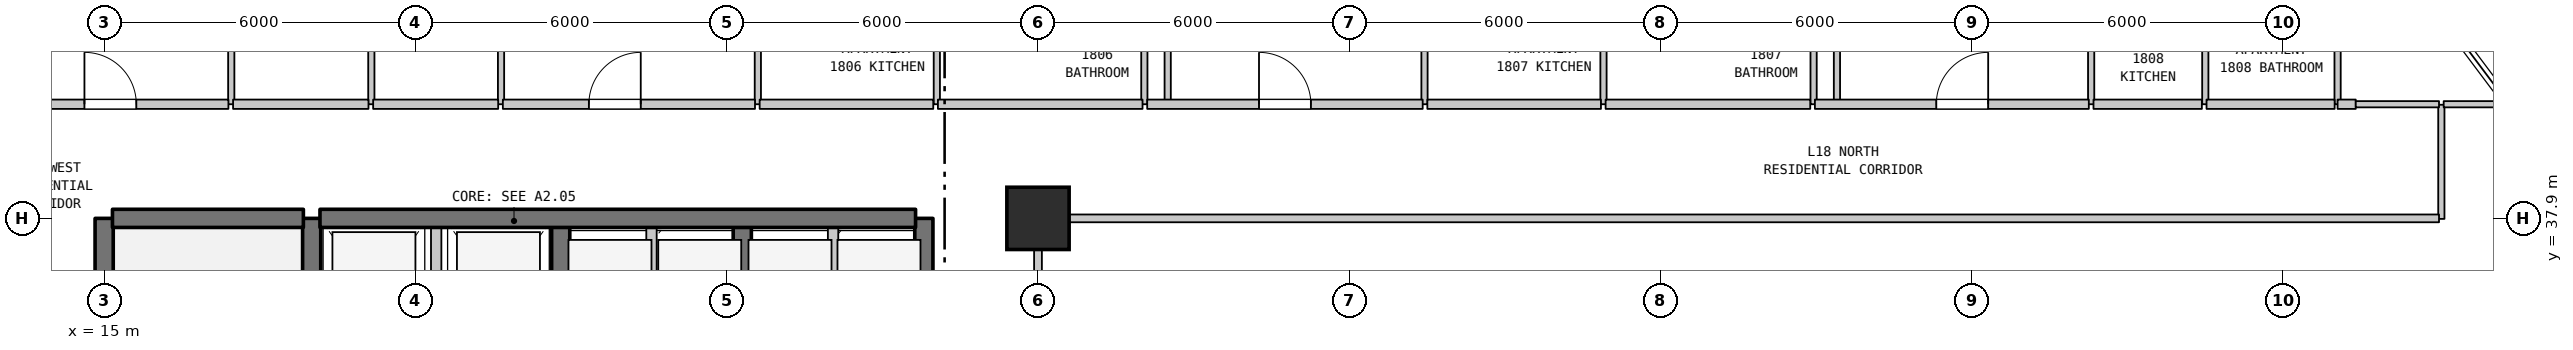
"""IFC4 building model, lengths in metres.
Left out: names, types, materials, properties, quantities, classifications, styles, units other than length and angle.
Written with IfcOpenShell. Run it as: python <this file> out.ifc"""

import sys

from ifc_helpers import new_model, si_unit, direction, frame, frame_2d, origin, origin_2d, place, context, subcontext, project, spatial, rectangle, extrude, element, fill, save


model = new_model("IFC4")
c1 = context("Model", 3, precision=1e-05, world=origin(), true_north=direction((0.0, 1.0)))
c2 = subcontext(c1, "Body", "Model", "MODEL_VIEW")
j1 = project(units=[si_unit("LENGTHUNIT", "METRE"), si_unit("PLANEANGLEUNIT", "RADIAN")], contexts=[c1])
p1 = place(None, origin())
s1 = spatial("IfcSite", under=j1, at=p1, CompositionType="ELEMENT")
p2 = place(p1, origin())
s2 = spatial("IfcBuilding", under=s1, at=p2, CompositionType="ELEMENT")
p3 = place(p2, frame((0.0, 0.0, 77.5)))
s3 = spatial("IfcBuildingStorey", under=s2, at=p3, CompositionType="ELEMENT", Elevation=77.5)
p4 = place(p3, frame((33.0, 37.9, 0.0), z_axis=(0.0, 0.0, 1.0), x_axis=(1.0, 0.0, 0.0)))
e1 = element("IfcColumn", 1, at=p4, inside=s3, PredefinedType="COLUMN", context=c2, shape_type="SweptSolid", body=[
    extrude(rectangle(XDim=1.2, YDim=1.2, at=origin_2d()), origin(), (0.0, 0.0, 1.0), 3.7),
])
p5 = place(p3, frame((15.0, 31.1, 0.0), z_axis=(0.0, 0.0, 1.0), x_axis=(0.0, 1.0, 0.0)))
e2 = element("IfcWall", 2, at=p5, inside=s3, PredefinedType="SHEAR", context=c2, shape_type="SweptSolid", body=[
    extrude(rectangle(XDim=6.8, YDim=0.35, at=frame_2d((3.4, 0.0))), origin(), (0.0, 0.0, 1.0), 3.28),
])
p6 = place(p3, frame((17.45, 40.1, 0.0), z_axis=(0.0, 0.0, 1.0), x_axis=(0.0, 1.0, 0.0)))
e3 = element("IfcWall", 3, at=p6, inside=s3, PredefinedType="PARTITIONING", context=c2, shape_type="SweptSolid", body=[
    extrude(rectangle(XDim=3.2, YDim=0.12, at=frame_2d((1.6, 0.0))), origin(), (0.0, 0.0, 1.0), 3.28),
])
p7 = place(p3, frame((19.0, 35.0, 0.0), z_axis=(0.0, 0.0, 1.0), x_axis=(0.0, 1.0, 0.0)))
e4 = element("IfcWall", 4, at=p7, inside=s3, PredefinedType="SHEAR", context=c2, shape_type="SweptSolid", body=[
    extrude(rectangle(XDim=2.9, YDim=0.35, at=frame_2d((1.45, 0.0))), origin(), (0.0, 0.0, 1.0), 3.28),
])
p8 = place(p3, frame((20.15, 40.1, 0.0), z_axis=(0.0, 0.0, 1.0), x_axis=(0.0, 1.0, 0.0)))
e5 = element("IfcWall", 5, at=p8, inside=s3, PredefinedType="PARTITIONING", context=c2, shape_type="SweptSolid", body=[
    extrude(rectangle(XDim=3.2, YDim=0.12, at=frame_2d((1.6, 0.0))), origin(), (0.0, 0.0, 1.0), 3.28),
])
p9 = place(p8, frame((1.15, 0.0, 0.0)))
e6 = element("IfcOpeningElement", 6, at=p9, cuts=e5, PredefinedType="OPENING", context=c2, shape_type="SweptSolid", body=[
    extrude(rectangle(XDim=0.9, YDim=2.15, at=frame_2d((0.45, 1.075))), frame((0.0, 0.07, 0.0), z_axis=(0.0, -1.0, 0.0), x_axis=(1.0, 0.0, 0.0)), (0.0, 0.0, 1.0), 0.14),
])
p10 = place(p3, frame((21.4, 35.0, 0.0), z_axis=(0.0, 0.0, 1.0), x_axis=(0.0, 1.0, 0.0)))
e7 = element("IfcWall", 7, at=p10, inside=s3, PredefinedType="STANDARD", context=c2, shape_type="SweptSolid", body=[
    extrude(rectangle(XDim=2.9, YDim=0.2, at=frame_2d((1.45, 0.0))), origin(), (0.0, 0.0, 1.0), 3.28),
])
p11 = place(p3, frame((22.65, 40.1, 0.0), z_axis=(0.0, 0.0, 1.0), x_axis=(0.0, 1.0, 0.0)))
e8 = element("IfcWall", 8, at=p11, inside=s3, PredefinedType="PARTITIONING", context=c2, shape_type="SweptSolid", body=[
    extrude(rectangle(XDim=2.05, YDim=0.12, at=frame_2d((1.025, 0.0))), origin(), (0.0, 0.0, 1.0), 3.28),
])
p12 = place(p3, frame((23.8, 35.0, 0.0), z_axis=(0.0, 0.0, 1.0), x_axis=(0.0, 1.0, 0.0)))
e9 = element("IfcWall", 9, at=p12, inside=s3, PredefinedType="SHEAR", context=c2, shape_type="SweptSolid", body=[
    extrude(rectangle(XDim=2.9, YDim=0.35, at=frame_2d((1.45, 0.0))), origin(), (0.0, 0.0, 1.0), 3.28),
])
p13 = place(p3, frame((25.55, 35.0, 0.0), z_axis=(0.0, 0.0, 1.0), x_axis=(0.0, 1.0, 0.0)))
e10 = element("IfcWall", 10, at=p13, inside=s3, PredefinedType="STANDARD", context=c2, shape_type="SweptSolid", body=[
    extrude(rectangle(XDim=2.9, YDim=0.2, at=frame_2d((1.45, 0.0))), origin(), (0.0, 0.0, 1.0), 3.28),
])
p14 = place(p3, frame((27.3, 35.0, 0.0), z_axis=(0.0, 0.0, 1.0), x_axis=(0.0, 1.0, 0.0)))
e11 = element("IfcWall", 11, at=p14, inside=s3, PredefinedType="SHEAR", context=c2, shape_type="SweptSolid", body=[
    extrude(rectangle(XDim=2.9, YDim=0.35, at=frame_2d((1.45, 0.0))), origin(), (0.0, 0.0, 1.0), 3.28),
])
p15 = place(p3, frame((27.6, 40.1, 0.0), z_axis=(0.0, 0.0, 1.0), x_axis=(0.0, 1.0, 0.0)))
e12 = element("IfcWall", 12, at=p15, inside=s3, PredefinedType="PARTITIONING", context=c2, shape_type="SweptSolid", body=[
    extrude(rectangle(XDim=2.3, YDim=0.12, at=frame_2d((1.15, 0.0))), origin(), (0.0, 0.0, 1.0), 3.28),
])
p16 = place(p3, frame((29.05, 35.0, 0.0), z_axis=(0.0, 0.0, 1.0), x_axis=(0.0, 1.0, 0.0)))
e13 = element("IfcWall", 13, at=p16, inside=s3, PredefinedType="STANDARD", context=c2, shape_type="SweptSolid", body=[
    extrude(rectangle(XDim=2.9, YDim=0.2, at=frame_2d((1.45, 0.0))), origin(), (0.0, 0.0, 1.0), 3.28),
])
p17 = place(p3, frame((30.8, 35.0, 0.0), z_axis=(0.0, 0.0, 1.0), x_axis=(0.0, 1.0, 0.0)))
e14 = element("IfcWall", 14, at=p17, inside=s3, PredefinedType="SHEAR", context=c2, shape_type="SweptSolid", body=[
    extrude(rectangle(XDim=2.9, YDim=0.35, at=frame_2d((1.45, 0.0))), origin(), (0.0, 0.0, 1.0), 3.28),
])
p18 = place(p3, frame((31.05, 40.1, 0.0), z_axis=(0.0, 0.0, 1.0), x_axis=(0.0, 1.0, 0.0)))
e15 = element("IfcWall", 15, at=p18, inside=s3, PredefinedType="PARTITIONING", context=c2, shape_type="SweptSolid", body=[
    extrude(rectangle(XDim=2.3, YDim=0.12, at=frame_2d((1.15, 0.0))), origin(), (0.0, 0.0, 1.0), 3.28),
])
p19 = place(p3, frame((33.0, 27.91, 0.0), z_axis=(0.0, 0.0, 1.0), x_axis=(0.0, 1.0, 0.0)))
e16 = element("IfcWall", 16, at=p19, inside=s3, PredefinedType="STANDARD", context=c2, shape_type="SweptSolid", body=[
    extrude(rectangle(XDim=9.98, YDim=0.15, at=frame_2d((4.99, 0.0))), origin(), (0.0, 0.0, 1.0), 2.78),
])
p20 = place(p3, frame((35.05, 40.1, 0.0), z_axis=(0.0, 0.0, 1.0), x_axis=(0.0, 1.0, 0.0)))
e17 = element("IfcWall", 17, at=p20, inside=s3, PredefinedType="PARTITIONING", context=c2, shape_type="SweptSolid", body=[
    extrude(rectangle(XDim=2.3, YDim=0.12, at=frame_2d((1.15, 0.0))), origin(), (0.0, 0.0, 1.0), 3.28),
])
p21 = place(p3, frame((35.5, 40.1, 0.0), z_axis=(0.0, 0.0, 1.0), x_axis=(0.0, 1.0, 0.0)))
e18 = element("IfcWall", 18, at=p21, inside=s3, PredefinedType="PARTITIONING", context=c2, shape_type="SweptSolid", body=[
    extrude(rectangle(XDim=2.05, YDim=0.12, at=frame_2d((1.025, 0.0))), origin(), (0.0, 0.0, 1.0), 3.28),
])
for number, where, z_axis, x_axis in (
    (19, (40.45, 40.1, 0.0), (0.0, 0.0, 1.0), (0.0, 1.0, 0.0)),
    (20, (43.9, 40.1, 0.0), (0.0, 0.0, 1.0), (0.0, 1.0, 0.0)),
    (21, (47.95, 40.1, 0.0), (0.0, 0.0, 1.0), (0.0, 1.0, 0.0)),
):
    element("IfcWall", number, at=place(p3, frame(where, z_axis=z_axis, x_axis=x_axis)), inside=s3, PredefinedType="PARTITIONING", context=c2, shape_type="SweptSolid", body=[
        extrude(rectangle(XDim=2.3, YDim=0.12, at=frame_2d((1.15, 0.0))), origin(), (0.0, 0.0, 1.0), 3.28),
    ])
p22 = place(p3, frame((48.4, 40.1, 0.0), z_axis=(0.0, 0.0, 1.0), x_axis=(0.0, 1.0, 0.0)))
e22 = element("IfcWall", 22, at=p22, inside=s3, PredefinedType="PARTITIONING", context=c2, shape_type="SweptSolid", body=[
    extrude(rectangle(XDim=13.79, YDim=0.12, at=frame_2d((6.895, 0.0))), origin(), (0.0, 0.0, 1.0), 3.28),
])
for number, where, z_axis, x_axis in (
    (23, (53.3, 40.1, 0.0), (0.0, 0.0, 1.0), (0.0, 1.0, 0.0)),
    (24, (55.5, 40.1, 0.0), (0.0, 0.0, 1.0), (0.0, 1.0, 0.0)),
    (25, (58.05, 40.1, 0.0), (0.0, 0.0, 1.0), (0.0, 1.0, 0.0)),
):
    element("IfcWall", number, at=place(p3, frame(where, z_axis=z_axis, x_axis=x_axis)), inside=s3, PredefinedType="PARTITIONING", context=c2, shape_type="SweptSolid", body=[
        extrude(rectangle(XDim=2.3, YDim=0.12, at=frame_2d((1.15, 0.0))), origin(), (0.0, 0.0, 1.0), 3.28),
    ])
p23 = place(p3, frame((60.05, 37.89, 0.0), z_axis=(0.0, 0.0, 1.0), x_axis=(0.0, 1.0, 0.0)))
e26 = element("IfcWall", 26, at=p23, inside=s3, PredefinedType="PARTITIONING", context=c2, shape_type="SweptSolid", body=[
    extrude(rectangle(XDim=2.2, YDim=0.12, at=frame_2d((1.1, 0.0))), origin(), (0.0, 0.0, 1.0), 3.28),
])
p24 = place(p3, frame((15.16, 37.9, 0.0), z_axis=(0.0, 0.0, 1.0), x_axis=(1.0, 0.0, 0.0)))
e27 = element("IfcWall", 27, at=p24, inside=s3, PredefinedType="SHEAR", context=c2, shape_type="SweptSolid", body=[
    extrude(rectangle(XDim=3.68, YDim=0.35, at=frame_2d((1.84, 0.0))), origin(), (0.0, 0.0, 1.0), 3.28),
])
p25 = place(p3, frame((19.16, 37.9, 0.0), z_axis=(0.0, 0.0, 1.0), x_axis=(1.0, 0.0, 0.0)))
e28 = element("IfcWall", 28, at=p25, inside=s3, PredefinedType="SHEAR", context=c2, shape_type="SweptSolid", body=[
    extrude(rectangle(XDim=11.48, YDim=0.35, at=frame_2d((5.74, 0.0))), origin(), (0.0, 0.0, 1.0), 3.28),
])
p26 = place(p3, frame((33.07, 37.9, 0.0), z_axis=(0.0, 0.0, 1.0), x_axis=(1.0, 0.0, 0.0)))
e29 = element("IfcWall", 29, at=p26, inside=s3, PredefinedType="STANDARD", context=c2, shape_type="SweptSolid", body=[
    extrude(rectangle(XDim=26.935, YDim=0.15, at=frame_2d((13.467, 0.0))), origin(), (0.0, 0.0, 1.0), 3.28),
])
p27 = place(p3, frame((12.875, 40.1, 0.0), z_axis=(0.0, 0.0, 1.0), x_axis=(1.0, 0.0, 0.0)))
e30 = element("IfcWall", 30, at=p27, inside=s3, PredefinedType="STANDARD", context=c2, shape_type="SweptSolid", body=[
    extrude(rectangle(XDim=4.52, YDim=0.18, at=frame_2d((2.26, 0.0))), origin(), (0.0, 0.0, 1.0), 3.28),
])
p28 = place(p27, frame((1.745, 0.0, 0.0)))
e31 = element("IfcOpeningElement", 31, at=p28, cuts=e30, PredefinedType="OPENING", context=c2, shape_type="SweptSolid", body=[
    extrude(rectangle(XDim=1.0, YDim=2.15, at=frame_2d((0.5, 1.075))), frame((0.0, 0.1, 0.0), z_axis=(0.0, -1.0, 0.0), x_axis=(1.0, 0.0, 0.0)), (0.0, 0.0, 1.0), 0.2),
])
p29 = place(p3, frame((17.485, 40.1, 0.0), z_axis=(0.0, 0.0, 1.0), x_axis=(1.0, 0.0, 0.0)))
e32 = element("IfcWall", 32, at=p29, inside=s3, PredefinedType="STANDARD", context=c2, shape_type="SweptSolid", body=[
    extrude(rectangle(XDim=2.61, YDim=0.18, at=frame_2d((1.305, 0.0))), origin(), (0.0, 0.0, 1.0), 3.28),
])
p30 = place(p3, frame((20.185, 40.1, 0.0), z_axis=(0.0, 0.0, 1.0), x_axis=(1.0, 0.0, 0.0)))
e33 = element("IfcWall", 33, at=p30, inside=s3, PredefinedType="STANDARD", context=c2, shape_type="SweptSolid", body=[
    extrude(rectangle(XDim=2.41, YDim=0.18, at=frame_2d((1.205, 0.0))), origin(), (0.0, 0.0, 1.0), 3.28),
])
p31 = place(p3, frame((22.685, 40.1, 0.0), z_axis=(0.0, 0.0, 1.0), x_axis=(1.0, 0.0, 0.0)))
e34 = element("IfcWall", 34, at=p31, inside=s3, PredefinedType="STANDARD", context=c2, shape_type="SweptSolid", body=[
    extrude(rectangle(XDim=4.86, YDim=0.18, at=frame_2d((2.43, 0.0))), origin(), (0.0, 0.0, 1.0), 3.28),
])
p32 = place(p31, frame((1.658, 0.0, 0.0)))
e35 = element("IfcOpeningElement", 35, at=p32, cuts=e34, PredefinedType="OPENING", context=c2, shape_type="SweptSolid", body=[
    extrude(rectangle(XDim=1.0, YDim=2.15, at=frame_2d((0.5, 1.075))), frame((0.0, 0.1, 0.0), z_axis=(0.0, -1.0, 0.0), x_axis=(1.0, 0.0, 0.0)), (0.0, 0.0, 1.0), 0.2),
])
p33 = place(p3, frame((27.635, 40.1, 0.0), z_axis=(0.0, 0.0, 1.0), x_axis=(1.0, 0.0, 0.0)))
e36 = element("IfcWall", 36, at=p33, inside=s3, PredefinedType="STANDARD", context=c2, shape_type="SweptSolid", body=[
    extrude(rectangle(XDim=3.346, YDim=0.18, at=frame_2d((1.673, 0.0))), origin(), (0.0, 0.0, 1.0), 3.28),
])
p34 = place(p3, frame((31.071, 40.1, 0.0), z_axis=(0.0, 0.0, 1.0), x_axis=(1.0, 0.0, 0.0)))
e37 = element("IfcWall", 37, at=p34, inside=s3, PredefinedType="STANDARD", context=c2, shape_type="SweptSolid", body=[
    extrude(rectangle(XDim=3.944, YDim=0.18, at=frame_2d((1.972, 0.0))), origin(), (0.0, 0.0, 1.0), 3.28),
])
p35 = place(p3, frame((35.105, 40.1, 0.0), z_axis=(0.0, 0.0, 1.0), x_axis=(1.0, 0.0, 0.0)))
e38 = element("IfcWall", 38, at=p35, inside=s3, PredefinedType="STANDARD", context=c2, shape_type="SweptSolid", body=[
    extrude(rectangle(XDim=5.31, YDim=0.18, at=frame_2d((2.655, 0.0))), origin(), (0.0, 0.0, 1.0), 3.28),
])
p36 = place(p35, frame((2.155, 0.0, 0.0)))
e39 = element("IfcOpeningElement", 39, at=p36, cuts=e38, PredefinedType="OPENING", context=c2, shape_type="SweptSolid", body=[
    extrude(rectangle(XDim=1.0, YDim=2.15, at=frame_2d((0.5, 1.075))), frame((0.0, 0.1, 0.0), z_axis=(0.0, -1.0, 0.0), x_axis=(1.0, 0.0, 0.0)), (0.0, 0.0, 1.0), 0.2),
])
p37 = place(p3, frame((40.505, 40.1, 0.0), z_axis=(0.0, 0.0, 1.0), x_axis=(1.0, 0.0, 0.0)))
e40 = element("IfcWall", 40, at=p37, inside=s3, PredefinedType="STANDARD", context=c2, shape_type="SweptSolid", body=[
    extrude(rectangle(XDim=3.346, YDim=0.18, at=frame_2d((1.673, 0.0))), origin(), (0.0, 0.0, 1.0), 3.28),
])
p38 = place(p3, frame((43.941, 40.1, 0.0), z_axis=(0.0, 0.0, 1.0), x_axis=(1.0, 0.0, 0.0)))
e41 = element("IfcWall", 41, at=p38, inside=s3, PredefinedType="STANDARD", context=c2, shape_type="SweptSolid", body=[
    extrude(rectangle(XDim=3.944, YDim=0.18, at=frame_2d((1.972, 0.0))), origin(), (0.0, 0.0, 1.0), 3.28),
])
p39 = place(p3, frame((47.975, 40.1, 0.0), z_axis=(0.0, 0.0, 1.0), x_axis=(1.0, 0.0, 0.0)))
e42 = element("IfcWall", 42, at=p39, inside=s3, PredefinedType="STANDARD", context=c2, shape_type="SweptSolid", body=[
    extrude(rectangle(XDim=5.28, YDim=0.18, at=frame_2d((2.64, 0.0))), origin(), (0.0, 0.0, 1.0), 3.28),
])
p40 = place(p39, frame((2.34, 0.0, 0.0)))
e43 = element("IfcOpeningElement", 43, at=p40, cuts=e42, PredefinedType="OPENING", context=c2, shape_type="SweptSolid", body=[
    extrude(rectangle(XDim=1.0, YDim=2.15, at=frame_2d((0.5, 1.075))), frame((0.0, 0.1, 0.0), z_axis=(0.0, -1.0, 0.0), x_axis=(1.0, 0.0, 0.0)), (0.0, 0.0, 1.0), 0.2),
])
p41 = place(p3, frame((53.345, 40.1, 0.0), z_axis=(0.0, 0.0, 1.0), x_axis=(1.0, 0.0, 0.0)))
e44 = element("IfcWall", 44, at=p41, inside=s3, PredefinedType="STANDARD", context=c2, shape_type="SweptSolid", body=[
    extrude(rectangle(XDim=2.089, YDim=0.18, at=frame_2d((1.044, 0.0))), origin(), (0.0, 0.0, 1.0), 3.28),
])
p42 = place(p3, frame((55.524, 40.1, 0.0), z_axis=(0.0, 0.0, 1.0), x_axis=(1.0, 0.0, 0.0)))
e45 = element("IfcWall", 45, at=p42, inside=s3, PredefinedType="STANDARD", context=c2, shape_type="SweptSolid", body=[
    extrude(rectangle(XDim=2.469, YDim=0.18, at=frame_2d((1.234, 0.0))), origin(), (0.0, 0.0, 1.0), 3.28),
])
p43 = place(p3, frame((58.05, 40.1, 0.0), z_axis=(0.0, 0.0, 1.0), x_axis=(1.0, 0.0, 0.0)))
e46 = element("IfcWall", 46, at=p43, inside=s3, PredefinedType="STANDARD", context=c2, shape_type="SweptSolid", body=[
    extrude(rectangle(XDim=0.35, YDim=0.18, at=frame_2d((0.175, 0.0))), origin(), (0.0, 0.0, 1.0), 3.28),
])
p44 = place(p3, frame((58.4, 40.1, 0.0), z_axis=(0.0, 0.0, 1.0), x_axis=(1.0, 0.0, 0.0)))
e47 = element("IfcWall", 47, at=p44, inside=s3, PredefinedType="PARTITIONING", context=c2, shape_type="SweptSolid", body=[
    extrude(rectangle(XDim=1.605, YDim=0.12, at=frame_2d((0.802, 0.0))), origin(), (0.0, 0.0, 1.0), 3.28),
])
p45 = place(p3, frame((60.095, 40.1, 0.0), z_axis=(0.0, 0.0, 1.0), x_axis=(1.0, 0.0, 0.0)))
e48 = element("IfcWall", 48, at=p45, inside=s3, PredefinedType="PARTITIONING", context=c2, shape_type="SweptSolid", body=[
    extrude(rectangle(XDim=1.245, YDim=0.12, at=frame_2d((0.623, 0.0))), origin(), (0.0, 0.0, 1.0), 3.28),
])
p46 = place(p28, origin())
e49 = element("IfcDoor", 49, at=p46, inside=s3, OperationType="SINGLE_SWING_LEFT", PredefinedType="DOOR", context=c2, shape_type="SweptSolid", body=[
    extrude(rectangle(XDim=1.0, YDim=2.15, at=frame_2d((0.5, 1.075))), frame((0.0, 0.025, 0.0), z_axis=(0.0, -1.0, 0.0), x_axis=(1.0, 0.0, 0.0)), (0.0, 0.0, 1.0), 0.05),
])
fill(e31, e49)
p47 = place(p32, origin())
e50 = element("IfcDoor", 50, at=p47, inside=s3, OperationType="SINGLE_SWING_RIGHT", PredefinedType="DOOR", context=c2, shape_type="SweptSolid", body=[
    extrude(rectangle(XDim=1.0, YDim=2.15, at=frame_2d((0.5, 1.075))), frame((0.0, 0.025, 0.0), z_axis=(0.0, -1.0, 0.0), x_axis=(1.0, 0.0, 0.0)), (0.0, 0.0, 1.0), 0.05),
])
fill(e35, e50)
p48 = place(p36, origin())
e51 = element("IfcDoor", 51, at=p48, inside=s3, OperationType="SINGLE_SWING_LEFT", PredefinedType="DOOR", context=c2, shape_type="SweptSolid", body=[
    extrude(rectangle(XDim=1.0, YDim=2.15, at=frame_2d((0.5, 1.075))), frame((0.0, 0.025, 0.0), z_axis=(0.0, -1.0, 0.0), x_axis=(1.0, 0.0, 0.0)), (0.0, 0.0, 1.0), 0.05),
])
fill(e39, e51)
p49 = place(p40, origin())
e52 = element("IfcDoor", 52, at=p49, inside=s3, OperationType="SINGLE_SWING_RIGHT", PredefinedType="DOOR", context=c2, shape_type="SweptSolid", body=[
    extrude(rectangle(XDim=1.0, YDim=2.15, at=frame_2d((0.5, 1.075))), frame((0.0, 0.025, 0.0), z_axis=(0.0, -1.0, 0.0), x_axis=(1.0, 0.0, 0.0)), (0.0, 0.0, 1.0), 0.05),
])
fill(e43, e52)
save(model, sys.argv[1])
